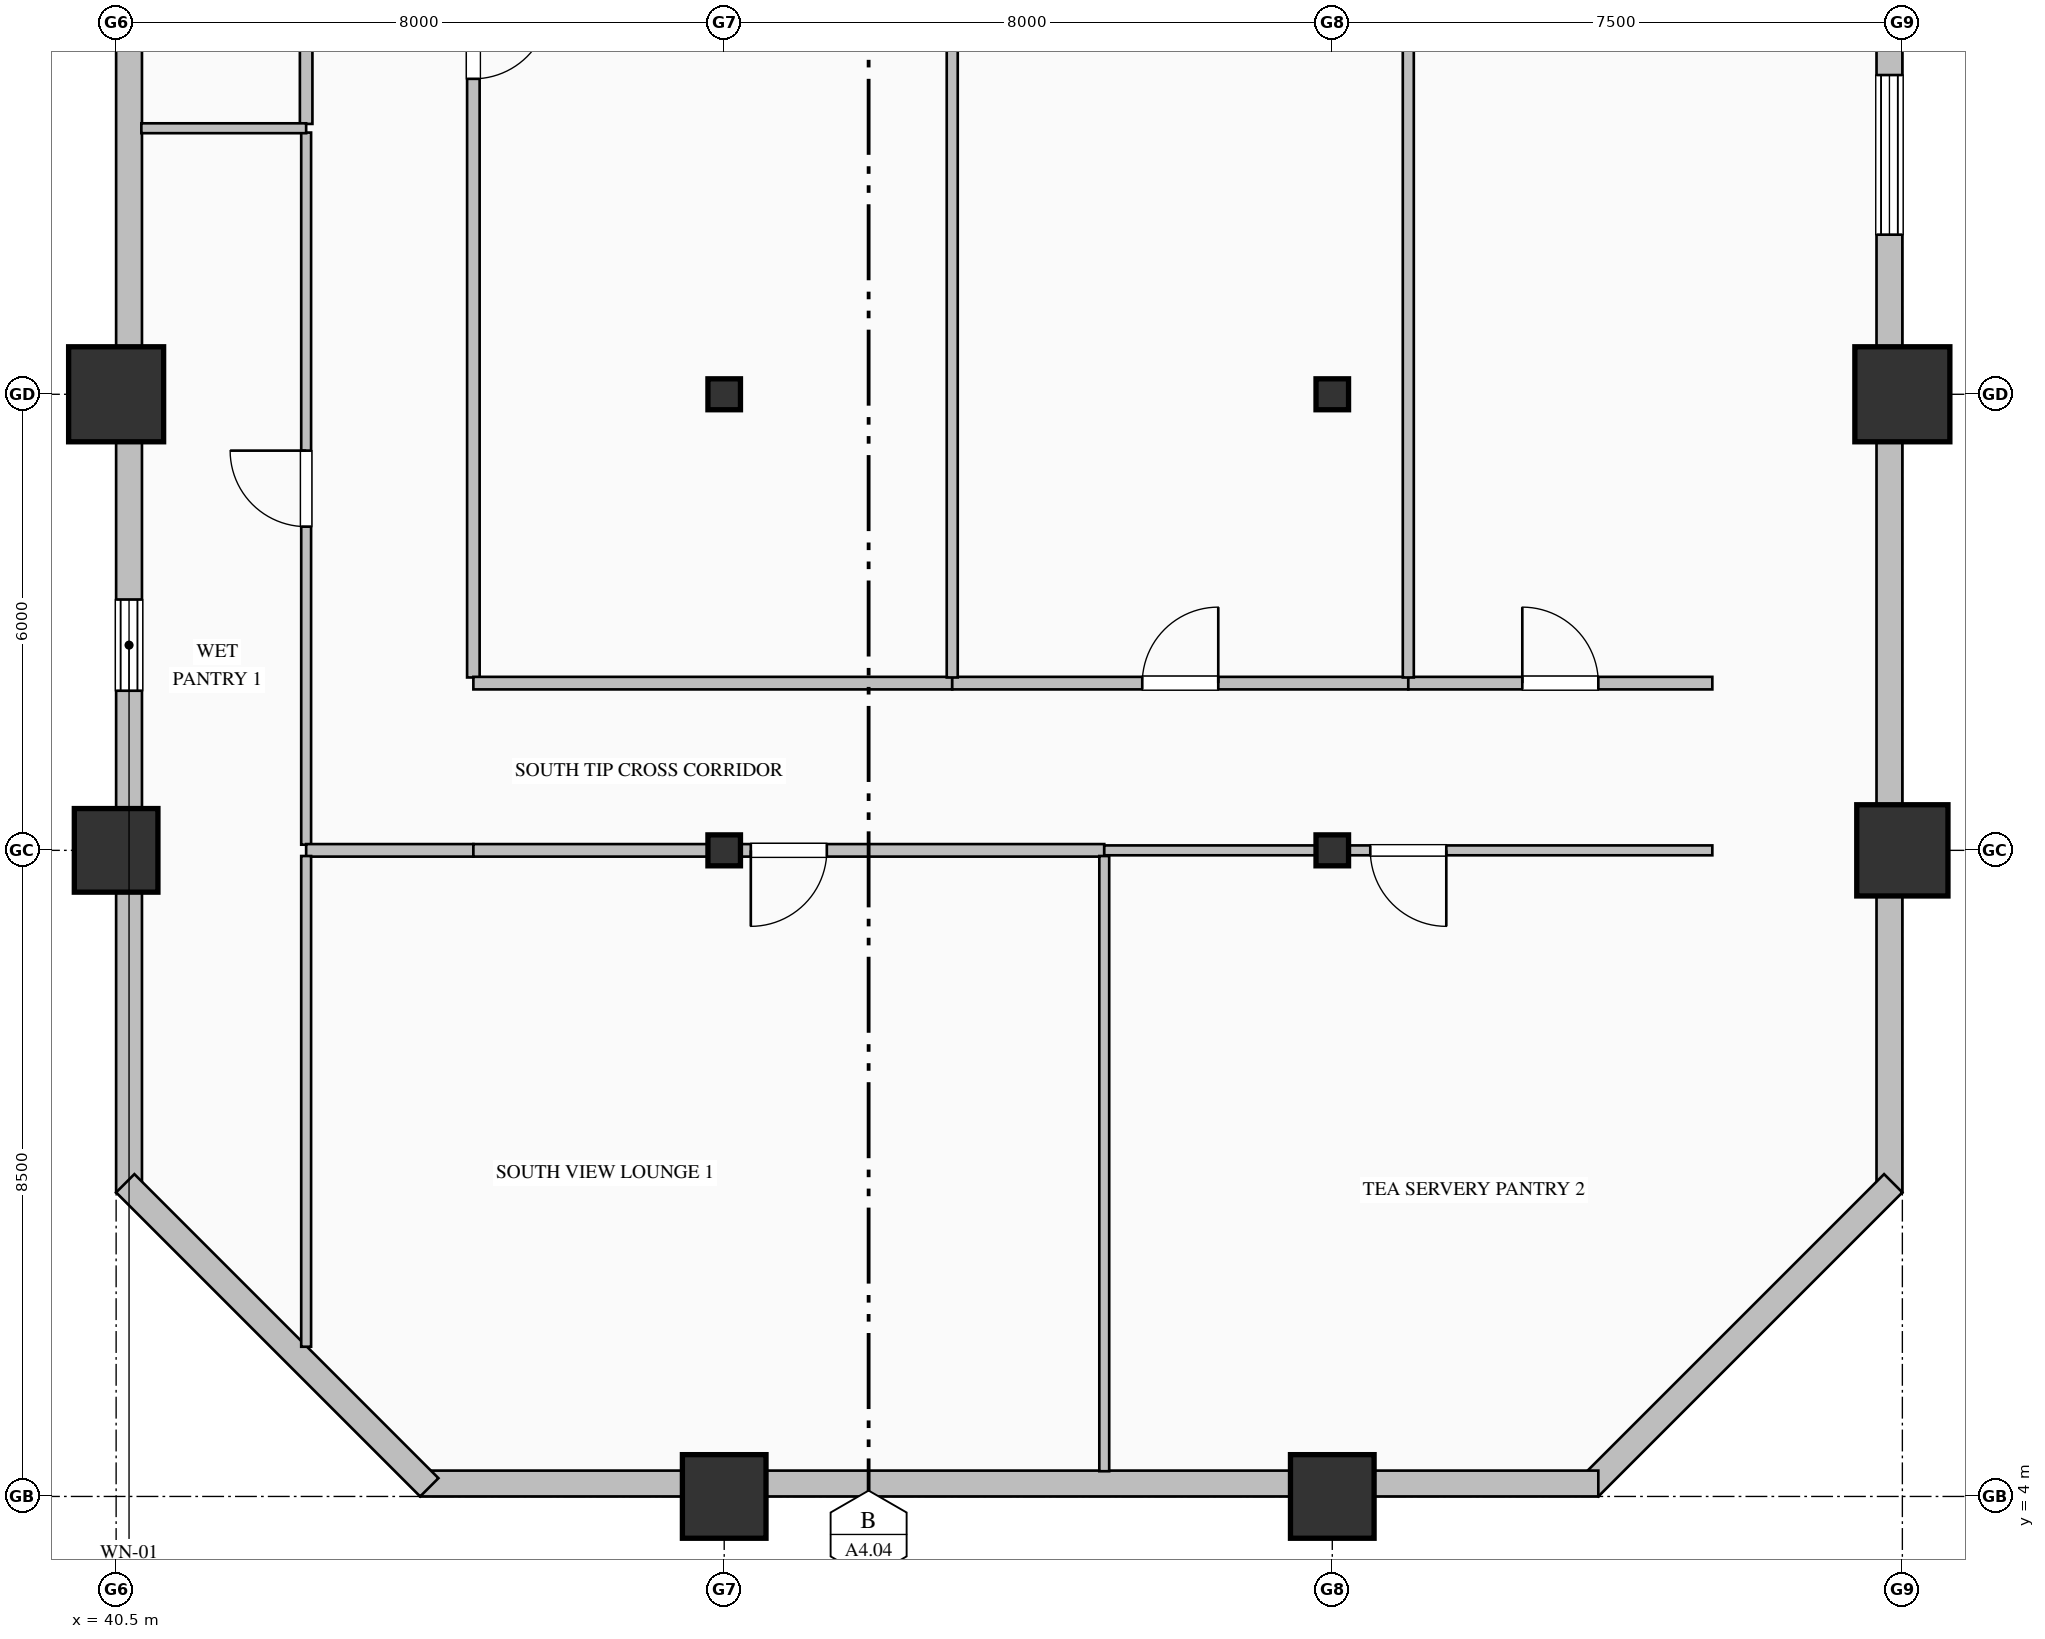
"""IFC4 building model, lengths in metres.
Left out: names, types, materials, properties, quantities, classifications, styles, units other than length and angle.
Written with IfcOpenShell. Run it as: python <this file> out.ifc"""

import sys

from ifc_helpers import new_model, si_unit, direction, frame, frame_2d, origin, origin_2d, place, context, subcontext, project, spatial, rectangle, hollow_rectangle, hollow_circle, i_section, extrude, element, fill, save


model = new_model("IFC4")
c1 = context("Model", 3, precision=1e-05, world=origin(), true_north=direction((0.0, 1.0)))
c2 = subcontext(c1, "Body", "Model", "MODEL_VIEW")
j1 = project(units=[si_unit("LENGTHUNIT", "METRE"), si_unit("PLANEANGLEUNIT", "RADIAN")], contexts=[c1])
p1 = place(None, origin())
s1 = spatial("IfcSite", under=j1, at=p1, CompositionType="ELEMENT")
p2 = place(p1, origin())
s2 = spatial("IfcBuilding", under=s1, at=p2, CompositionType="ELEMENT")
p3 = place(p2, frame((0.0, 0.0, 68.2)))
s3 = spatial("IfcBuildingStorey", under=s2, at=p3, CompositionType="ELEMENT", Elevation=68.2)
p4 = place(p3, frame((40.5, 12.5, 0.0), z_axis=(0.0, 0.0, 1.0), x_axis=(1.0, 0.0, 0.0)))
e1 = element("IfcColumn", 1, at=p4, inside=s3, PredefinedType="COLUMN", context=c2, shape_type="SweptSolid", body=[
    extrude(hollow_rectangle(XDim=1.1, YDim=1.1, WallThickness=0.04, at=origin_2d()), origin(), (0.0, 0.0, 1.0), 4.0),
])
p5 = place(p3, frame((40.5, 18.5, 0.0), z_axis=(0.0, 0.0, 1.0), x_axis=(1.0, 0.0, 0.0)))
e2 = element("IfcColumn", 2, at=p5, inside=s3, PredefinedType="COLUMN", context=c2, shape_type="SweptSolid", body=[
    extrude(hollow_rectangle(XDim=1.25, YDim=1.25, WallThickness=0.045, at=origin_2d()), origin(), (0.0, 0.0, 1.0), 4.0),
])
p6 = place(p3, frame((48.5, 4.0, 0.0), z_axis=(0.0, 0.0, 1.0), x_axis=(1.0, 0.0, 0.0)))
e3 = element("IfcColumn", 3, at=p6, inside=s3, PredefinedType="COLUMN", context=c2, shape_type="SweptSolid", body=[
    extrude(hollow_rectangle(XDim=1.1, YDim=1.1, WallThickness=0.04, at=origin_2d()), origin(), (0.0, 0.0, 1.0), 4.0),
])
for number, where, z_axis, x_axis in (
    (4, (48.5, 12.5, 0.0), (0.0, 0.0, 1.0), (1.0, 0.0, 0.0)),
    (5, (48.5, 18.5, 0.0), (0.0, 0.0, 1.0), (1.0, 0.0, 0.0)),
):
    element("IfcColumn", number, at=place(p3, frame(where, z_axis=z_axis, x_axis=x_axis)), inside=s3, PredefinedType="COLUMN", context=c2, shape_type="SweptSolid", body=[
        extrude(i_section(OverallWidth=0.407, OverallDepth=0.428, WebThickness=0.02, FlangeThickness=0.035, FilletRadius=0.022, at=origin_2d()), origin(), (0.0, 0.0, 1.0), 4.0),
    ])
p7 = place(p3, frame((56.5, 4.0, 0.0), z_axis=(0.0, 0.0, 1.0), x_axis=(1.0, 0.0, 0.0)))
e6 = element("IfcColumn", 6, at=p7, inside=s3, PredefinedType="COLUMN", context=c2, shape_type="SweptSolid", body=[
    extrude(hollow_rectangle(XDim=1.1, YDim=1.1, WallThickness=0.04, at=origin_2d()), origin(), (0.0, 0.0, 1.0), 4.0),
])
for number, where, z_axis, x_axis in (
    (7, (56.5, 12.5, 0.0), (0.0, 0.0, 1.0), (1.0, 0.0, 0.0)),
    (8, (56.5, 18.5, 0.0), (0.0, 0.0, 1.0), (1.0, 0.0, 0.0)),
):
    element("IfcColumn", number, at=place(p3, frame(where, z_axis=z_axis, x_axis=x_axis)), inside=s3, PredefinedType="COLUMN", context=c2, shape_type="SweptSolid", body=[
        extrude(i_section(OverallWidth=0.407, OverallDepth=0.428, WebThickness=0.02, FlangeThickness=0.035, FilletRadius=0.022, at=origin_2d()), origin(), (0.0, 0.0, 1.0), 4.0),
    ])
p8 = place(p3, frame((64.0, 12.5, 0.0), z_axis=(0.0, 0.0, 1.0), x_axis=(1.0, 0.0, 0.0)))
e9 = element("IfcColumn", 9, at=p8, inside=s3, PredefinedType="COLUMN", context=c2, shape_type="SweptSolid", body=[
    extrude(hollow_circle(Radius=0.6, WallThickness=0.04, at=origin_2d()), origin(), (0.0, 0.0, 1.0), 4.0),
])
p9 = place(p3, frame((64.0, 18.5, 0.0), z_axis=(0.0, 0.0, 1.0), x_axis=(1.0, 0.0, 0.0)))
e10 = element("IfcColumn", 10, at=p9, inside=s3, PredefinedType="COLUMN", context=c2, shape_type="SweptSolid", body=[
    extrude(hollow_rectangle(XDim=1.25, YDim=1.25, WallThickness=0.045, at=origin_2d()), origin(), (0.0, 0.0, 1.0), 4.0),
])
p10 = place(p3, frame((40.67, 8.0, 0.0), z_axis=(0.0, 0.0, 1.0), x_axis=(0.0, 1.0, 0.0)))
e11 = element("IfcWall", 11, at=p10, inside=s3, PredefinedType="SOLIDWALL", context=c2, shape_type="SweptSolid", body=[
    extrude(rectangle(XDim=20.34, YDim=0.34, at=frame_2d((10.17, 0.0))), origin(), (0.0, 0.0, 1.0), 3.05),
])
p11 = place(p10, frame((6.6, 0.0, 0.7)))
e12 = element("IfcOpeningElement", 12, at=p11, cuts=e11, PredefinedType="OPENING", context=c2, shape_type="SweptSolid", body=[
    extrude(rectangle(XDim=1.2, YDim=1.85, at=frame_2d((0.6, 0.925))), frame((0.0, 0.18, 0.0), z_axis=(0.0, -1.0, 0.0), x_axis=(1.0, 0.0, 0.0)), (0.0, 0.0, 1.0), 0.36),
])
p12 = place(p3, frame((63.83, 36.05, 0.0), z_axis=(0.0, 0.0, 1.0), x_axis=(0.0, -1.0, 0.0)))
e13 = element("IfcWall", 13, at=p12, inside=s3, PredefinedType="SOLIDWALL", context=c2, shape_type="SweptSolid", body=[
    extrude(rectangle(XDim=28.05, YDim=0.34, at=frame_2d((14.025, 0.0))), origin(), (0.0, 0.0, 1.0), 3.25),
])
p13 = place(p12, frame((2.55, 0.0, 0.85)))
e14 = element("IfcOpeningElement", 14, at=p13, cuts=e13, PredefinedType="OPENING", context=c2, shape_type="SweptSolid", body=[
    extrude(rectangle(XDim=2.1, YDim=2.05, at=frame_2d((1.05, 1.025))), frame((0.0, 0.18, 0.0), z_axis=(0.0, -1.0, 0.0), x_axis=(1.0, 0.0, 0.0)), (0.0, 0.0, 1.0), 0.36),
])
p14 = place(p12, frame((9.9, 0.0, 0.85)))
e15 = element("IfcOpeningElement", 15, at=p14, cuts=e13, PredefinedType="OPENING", context=c2, shape_type="SweptSolid", body=[
    extrude(rectangle(XDim=1.8, YDim=2.05, at=frame_2d((0.9, 1.025))), frame((0.0, 0.18, 0.0), z_axis=(0.0, -1.0, 0.0), x_axis=(1.0, 0.0, 0.0)), (0.0, 0.0, 1.0), 0.36),
])
p15 = place(p12, frame((13.35, 0.0, 0.85)))
e16 = element("IfcOpeningElement", 16, at=p15, cuts=e13, PredefinedType="OPENING", context=c2, shape_type="SweptSolid", body=[
    extrude(rectangle(XDim=2.1, YDim=2.05, at=frame_2d((1.05, 1.025))), frame((0.0, 0.18, 0.0), z_axis=(0.0, -1.0, 0.0), x_axis=(1.0, 0.0, 0.0)), (0.0, 0.0, 1.0), 0.36),
])
p16 = place(p3, frame((63.88, 8.12, 0.0), z_axis=(0.0, 0.0, 1.0), x_axis=(-0.707106781187, -0.707106781187, 0.0)))
e17 = element("IfcWall", 17, at=p16, inside=s3, PredefinedType="SOLIDWALL", context=c2, shape_type="SweptSolid", body=[
    extrude(rectangle(XDim=5.657, YDim=0.34, at=frame_2d((2.828, 0.0))), origin(), (0.0, 0.0, 1.0), 3.75),
])
p17 = place(p3, frame((60.0, 4.17, 0.0), z_axis=(0.0, 0.0, 1.0), x_axis=(-1.0, 0.0, 0.0)))
e18 = element("IfcWall", 18, at=p17, inside=s3, PredefinedType="SOLIDWALL", context=c2, shape_type="SweptSolid", body=[
    extrude(rectangle(XDim=15.5, YDim=0.34, at=frame_2d((7.75, 0.0))), origin(), (0.0, 0.0, 1.0), 3.25),
])
p18 = place(p3, frame((44.62, 4.12, 0.0), z_axis=(0.0, 0.0, 1.0), x_axis=(-0.707106781187, 0.707106781187, 0.0)))
e19 = element("IfcWall", 19, at=p18, inside=s3, PredefinedType="SOLIDWALL", context=c2, shape_type="SweptSolid", body=[
    extrude(rectangle(XDim=5.657, YDim=0.34, at=frame_2d((2.828, 0.0))), origin(), (0.0, 0.0, 1.0), 3.75),
])
p19 = place(p3, frame((45.2, 31.525, 0.0), z_axis=(0.0, 0.0, 1.0), x_axis=(0.0, -1.0, 0.0)))
e20 = element("IfcWall", 20, at=p19, inside=s3, PredefinedType="PARTITIONING", context=c2, shape_type="SweptSolid", body=[
    extrude(rectangle(XDim=16.751, YDim=0.165, at=frame_2d((8.375, 0.0))), origin(), (0.0, 0.0, 1.0), 3.75),
])
p20 = place(p19, frame((7.875, 0.0, 0.0)))
e21 = element("IfcOpeningElement", 21, at=p20, cuts=e20, PredefinedType="OPENING", context=c2, shape_type="SweptSolid", body=[
    extrude(rectangle(XDim=1.0, YDim=2.15, at=frame_2d((0.5, 1.075))), frame((0.0, 0.093, 0.0), z_axis=(0.0, -1.0, 0.0), x_axis=(1.0, 0.0, 0.0)), (0.0, 0.0, 1.0), 0.185),
])
p21 = place(p3, frame((43.0, 12.574, 0.0), z_axis=(0.0, 0.0, 1.0), x_axis=(0.0, 1.0, 0.0)))
e22 = element("IfcWall", 22, at=p21, inside=s3, PredefinedType="PARTITIONING", context=c2, shape_type="SweptSolid", body=[
    extrude(rectangle(XDim=9.369, YDim=0.13, at=frame_2d((4.684, 0.0))), origin(), (0.0, 0.0, 1.0), 3.75),
])
p22 = place(p21, frame((4.184, 0.0, 0.0)))
e23 = element("IfcOpeningElement", 23, at=p22, cuts=e22, PredefinedType="OPENING", context=c2, shape_type="SweptSolid", body=[
    extrude(rectangle(XDim=1.0, YDim=2.15, at=frame_2d((0.5, 1.075))), frame((0.0, 0.075, 0.0), z_axis=(0.0, -1.0, 0.0), x_axis=(1.0, 0.0, 0.0)), (0.0, 0.0, 1.0), 0.15),
])
p23 = place(p3, frame((43.0, 22.057, 0.0), z_axis=(0.0, 0.0, 1.0), x_axis=(0.0, 1.0, 0.0)))
e24 = element("IfcWall", 24, at=p23, inside=s3, PredefinedType="PARTITIONING", context=c2, shape_type="SweptSolid", body=[
    extrude(rectangle(XDim=9.469, YDim=0.165, at=frame_2d((4.734, 0.0))), origin(), (0.0, 0.0, 1.0), 3.75),
])
p24 = place(p23, frame((4.234, 0.0, 0.0)))
e25 = element("IfcOpeningElement", 25, at=p24, cuts=e24, PredefinedType="OPENING", context=c2, shape_type="SweptSolid", body=[
    extrude(rectangle(XDim=1.0, YDim=2.15, at=frame_2d((0.5, 1.075))), frame((0.0, 0.093, 0.0), z_axis=(0.0, -1.0, 0.0), x_axis=(1.0, 0.0, 0.0)), (0.0, 0.0, 1.0), 0.185),
])
p25 = place(p3, frame((45.2, 12.5, 0.0), z_axis=(0.0, 0.0, 1.0), x_axis=(-1.0, 0.0, 0.0)))
e26 = element("IfcWall", 26, at=p25, inside=s3, PredefinedType="PARTITIONING", context=c2, shape_type="SweptSolid", body=[
    extrude(rectangle(XDim=2.2, YDim=0.165, at=frame_2d((1.1, 0.0))), origin(), (0.0, 0.0, 1.0), 3.042),
])
p26 = place(p3, frame((45.2, 14.7, 0.0), z_axis=(0.0, 0.0, 1.0), x_axis=(1.0, 0.0, 0.0)))
e27 = element("IfcWall", 27, at=p26, inside=s3, PredefinedType="PARTITIONING", context=c2, shape_type="SweptSolid", body=[
    extrude(rectangle(XDim=6.3, YDim=0.165, at=frame_2d((3.15, 0.0))), origin(), (0.0, 0.0, 1.0), 3.75),
])
p27 = place(p3, frame((51.5, 14.7, 0.0), z_axis=(0.0, 0.0, 1.0), x_axis=(1.0, 0.0, 0.0)))
e28 = element("IfcWall", 28, at=p27, inside=s3, PredefinedType="PARTITIONING", context=c2, shape_type="SweptSolid", body=[
    extrude(rectangle(XDim=6.0, YDim=0.165, at=frame_2d((3.0, 0.0))), origin(), (0.0, 0.0, 1.0), 3.75),
])
p28 = place(p27, frame((2.5, 0.0, 0.0)))
e29 = element("IfcOpeningElement", 29, at=p28, cuts=e28, PredefinedType="OPENING", context=c2, shape_type="SweptSolid", body=[
    extrude(rectangle(XDim=1.0, YDim=2.15, at=frame_2d((0.5, 1.075))), frame((0.0, 0.093, 0.0), z_axis=(0.0, -1.0, 0.0), x_axis=(1.0, 0.0, 0.0)), (0.0, 0.0, 1.0), 0.185),
])
p29 = place(p3, frame((57.5, 14.7, 0.0), z_axis=(0.0, 0.0, 1.0), x_axis=(1.0, 0.0, 0.0)))
e30 = element("IfcWall", 30, at=p29, inside=s3, PredefinedType="PARTITIONING", context=c2, shape_type="SweptSolid", body=[
    extrude(rectangle(XDim=4.0, YDim=0.165, at=frame_2d((2.0, 0.0))), origin(), (0.0, 0.0, 1.0), 3.75),
])
p30 = place(p29, frame((1.5, 0.0, 0.0)))
e31 = element("IfcOpeningElement", 31, at=p30, cuts=e30, PredefinedType="OPENING", context=c2, shape_type="SweptSolid", body=[
    extrude(rectangle(XDim=1.0, YDim=2.15, at=frame_2d((0.5, 1.075))), frame((0.0, 0.093, 0.0), z_axis=(0.0, -1.0, 0.0), x_axis=(1.0, 0.0, 0.0)), (0.0, 0.0, 1.0), 0.185),
])
p31 = place(p3, frame((53.5, 12.5, 0.0), z_axis=(0.0, 0.0, 1.0), x_axis=(-1.0, 0.0, 0.0)))
e32 = element("IfcWall", 32, at=p31, inside=s3, PredefinedType="PARTITIONING", context=c2, shape_type="SweptSolid", body=[
    extrude(rectangle(XDim=8.3, YDim=0.165, at=frame_2d((4.15, 0.0))), origin(), (0.0, 0.0, 1.0), 3.042),
])
p32 = place(p31, frame((3.65, 0.0, 0.0)))
e33 = element("IfcOpeningElement", 33, at=p32, cuts=e32, PredefinedType="OPENING", context=c2, shape_type="SweptSolid", body=[
    extrude(rectangle(XDim=1.0, YDim=2.15, at=frame_2d((0.5, 1.075))), frame((0.0, 0.093, 0.0), z_axis=(0.0, -1.0, 0.0), x_axis=(1.0, 0.0, 0.0)), (0.0, 0.0, 1.0), 0.185),
])
p33 = place(p3, frame((61.5, 12.5, 0.0), z_axis=(0.0, 0.0, 1.0), x_axis=(-1.0, 0.0, 0.0)))
e34 = element("IfcWall", 34, at=p33, inside=s3, PredefinedType="PARTITIONING", context=c2, shape_type="SweptSolid", body=[
    extrude(rectangle(XDim=8.0, YDim=0.13, at=frame_2d((4.0, 0.0))), origin(), (0.0, 0.0, 1.0), 3.042),
])
p34 = place(p33, frame((3.5, 0.0, 0.0)))
e35 = element("IfcOpeningElement", 35, at=p34, cuts=e34, PredefinedType="OPENING", context=c2, shape_type="SweptSolid", body=[
    extrude(rectangle(XDim=1.0, YDim=2.15, at=frame_2d((0.5, 1.075))), frame((0.0, 0.075, 0.0), z_axis=(0.0, -1.0, 0.0), x_axis=(1.0, 0.0, 0.0)), (0.0, 0.0, 1.0), 0.15),
])
p35 = place(p3, frame((51.5, 31.525, 0.0), z_axis=(0.0, 0.0, 1.0), x_axis=(0.0, -1.0, 0.0)))
e36 = element("IfcWall", 36, at=p35, inside=s3, PredefinedType="PARTITIONING", context=c2, shape_type="SweptSolid", body=[
    extrude(rectangle(XDim=16.751, YDim=0.145, at=frame_2d((8.375, 0.0))), origin(), (0.0, 0.0, 1.0), 3.75),
])
p36 = place(p3, frame((57.5, 36.0, 0.0), z_axis=(0.0, 0.0, 1.0), x_axis=(0.0, -1.0, 0.0)))
e37 = element("IfcWall", 37, at=p36, inside=s3, PredefinedType="PARTITIONING", context=c2, shape_type="SweptSolid", body=[
    extrude(rectangle(XDim=21.226, YDim=0.145, at=frame_2d((10.613, 0.0))), origin(), (0.0, 0.0, 1.0), 3.75),
])
p37 = place(p3, frame((40.832, 22.0, 0.0), z_axis=(0.0, 0.0, 1.0), x_axis=(1.0, 0.0, 0.0)))
e38 = element("IfcWall", 38, at=p37, inside=s3, PredefinedType="PARTITIONING", context=c2, shape_type="SweptSolid", body=[
    extrude(rectangle(XDim=2.168, YDim=0.13, at=frame_2d((1.084, 0.0))), origin(), (0.0, 0.0, 1.0), 3.75),
])
p38 = place(p3, frame((43.0, 12.426, 0.0), z_axis=(0.0, 0.0, 1.0), x_axis=(0.0, -1.0, 0.0)))
e39 = element("IfcWall", 39, at=p38, inside=s3, PredefinedType="PARTITIONING", context=c2, shape_type="SweptSolid", body=[
    extrude(rectangle(XDim=6.456, YDim=0.13, at=frame_2d((3.228, 0.0))), origin(), (0.0, 0.0, 1.0), 3.75),
])
p39 = place(p3, frame((53.5, 12.426, 0.0), z_axis=(0.0, 0.0, 1.0), x_axis=(0.0, -1.0, 0.0)))
e40 = element("IfcWall", 40, at=p39, inside=s3, PredefinedType="PARTITIONING", context=c2, shape_type="SweptSolid", body=[
    extrude(rectangle(XDim=8.094, YDim=0.13, at=frame_2d((4.047, 0.0))), origin(), (0.0, 0.0, 1.0), 3.75),
])
p40 = place(p11, origin())
e41 = element("IfcWindow", 41, at=p40, inside=s3, PartitioningType="DOUBLE_PANEL_VERTICAL", PredefinedType="WINDOW", context=c2, shape_type="SweptSolid", body=[
    extrude(rectangle(XDim=1.2, YDim=1.85, at=frame_2d((0.6, 0.925))), frame((0.0, 0.15, 0.0), z_axis=(0.0, -1.0, 0.0), x_axis=(1.0, 0.0, 0.0)), (0.0, 0.0, 1.0), 0.06),
])
fill(e12, e41)
p41 = place(p15, origin())
e42 = element("IfcWindow", 42, at=p41, inside=s3, PartitioningType="TRIPLE_PANEL_VERTICAL", PredefinedType="WINDOW", context=c2, shape_type="SweptSolid", body=[
    extrude(rectangle(XDim=2.1, YDim=2.05, at=frame_2d((1.05, 1.025))), frame((0.0, 0.15, 0.0), z_axis=(0.0, -1.0, 0.0), x_axis=(1.0, 0.0, 0.0)), (0.0, 0.0, 1.0), 0.06),
])
fill(e16, e42)
p42 = place(p20, origin())
e43 = element("IfcDoor", 43, at=p42, inside=s3, OperationType="SINGLE_SWING_LEFT", PredefinedType="DOOR", context=c2, shape_type="SweptSolid", body=[
    extrude(rectangle(XDim=1.0, YDim=2.15, at=frame_2d((0.5, 1.075))), frame((0.0, 0.025, 0.0), z_axis=(0.0, -1.0, 0.0), x_axis=(1.0, 0.0, 0.0)), (0.0, 0.0, 1.0), 0.05),
])
fill(e21, e43)
p43 = place(p28, origin())
e44 = element("IfcDoor", 44, at=p43, inside=s3, OperationType="SINGLE_SWING_RIGHT", PredefinedType="DOOR", context=c2, shape_type="SweptSolid", body=[
    extrude(rectangle(XDim=1.0, YDim=2.15, at=frame_2d((0.5, 1.075))), frame((0.0, 0.025, 0.0), z_axis=(0.0, -1.0, 0.0), x_axis=(1.0, 0.0, 0.0)), (0.0, 0.0, 1.0), 0.05),
])
fill(e29, e44)
p44 = place(p30, origin())
e45 = element("IfcDoor", 45, at=p44, inside=s3, OperationType="SINGLE_SWING_LEFT", PredefinedType="DOOR", context=c2, shape_type="SweptSolid", body=[
    extrude(rectangle(XDim=1.0, YDim=2.15, at=frame_2d((0.5, 1.075))), frame((0.0, 0.025, 0.0), z_axis=(0.0, -1.0, 0.0), x_axis=(1.0, 0.0, 0.0)), (0.0, 0.0, 1.0), 0.05),
])
fill(e31, e45)
p45 = place(p22, origin())
e46 = element("IfcDoor", 46, at=p45, inside=s3, OperationType="SINGLE_SWING_RIGHT", PredefinedType="DOOR", context=c2, shape_type="SweptSolid", body=[
    extrude(rectangle(XDim=1.0, YDim=2.15, at=frame_2d((0.5, 1.075))), frame((0.0, 0.025, 0.0), z_axis=(0.0, -1.0, 0.0), x_axis=(1.0, 0.0, 0.0)), (0.0, 0.0, 1.0), 0.05),
])
fill(e23, e46)
p46 = place(p32, origin())
e47 = element("IfcDoor", 47, at=p46, inside=s3, OperationType="SINGLE_SWING_RIGHT", PredefinedType="DOOR", context=c2, shape_type="SweptSolid", body=[
    extrude(rectangle(XDim=1.0, YDim=2.15, at=frame_2d((0.5, 1.075))), frame((0.0, 0.025, 0.0), z_axis=(0.0, -1.0, 0.0), x_axis=(1.0, 0.0, 0.0)), (0.0, 0.0, 1.0), 0.05),
])
fill(e33, e47)
p47 = place(p34, origin())
e48 = element("IfcDoor", 48, at=p47, inside=s3, OperationType="SINGLE_SWING_LEFT", PredefinedType="DOOR", context=c2, shape_type="SweptSolid", body=[
    extrude(rectangle(XDim=1.0, YDim=2.15, at=frame_2d((0.5, 1.075))), frame((0.0, 0.025, 0.0), z_axis=(0.0, -1.0, 0.0), x_axis=(1.0, 0.0, 0.0)), (0.0, 0.0, 1.0), 0.05),
])
fill(e35, e48)
save(model, sys.argv[1])
